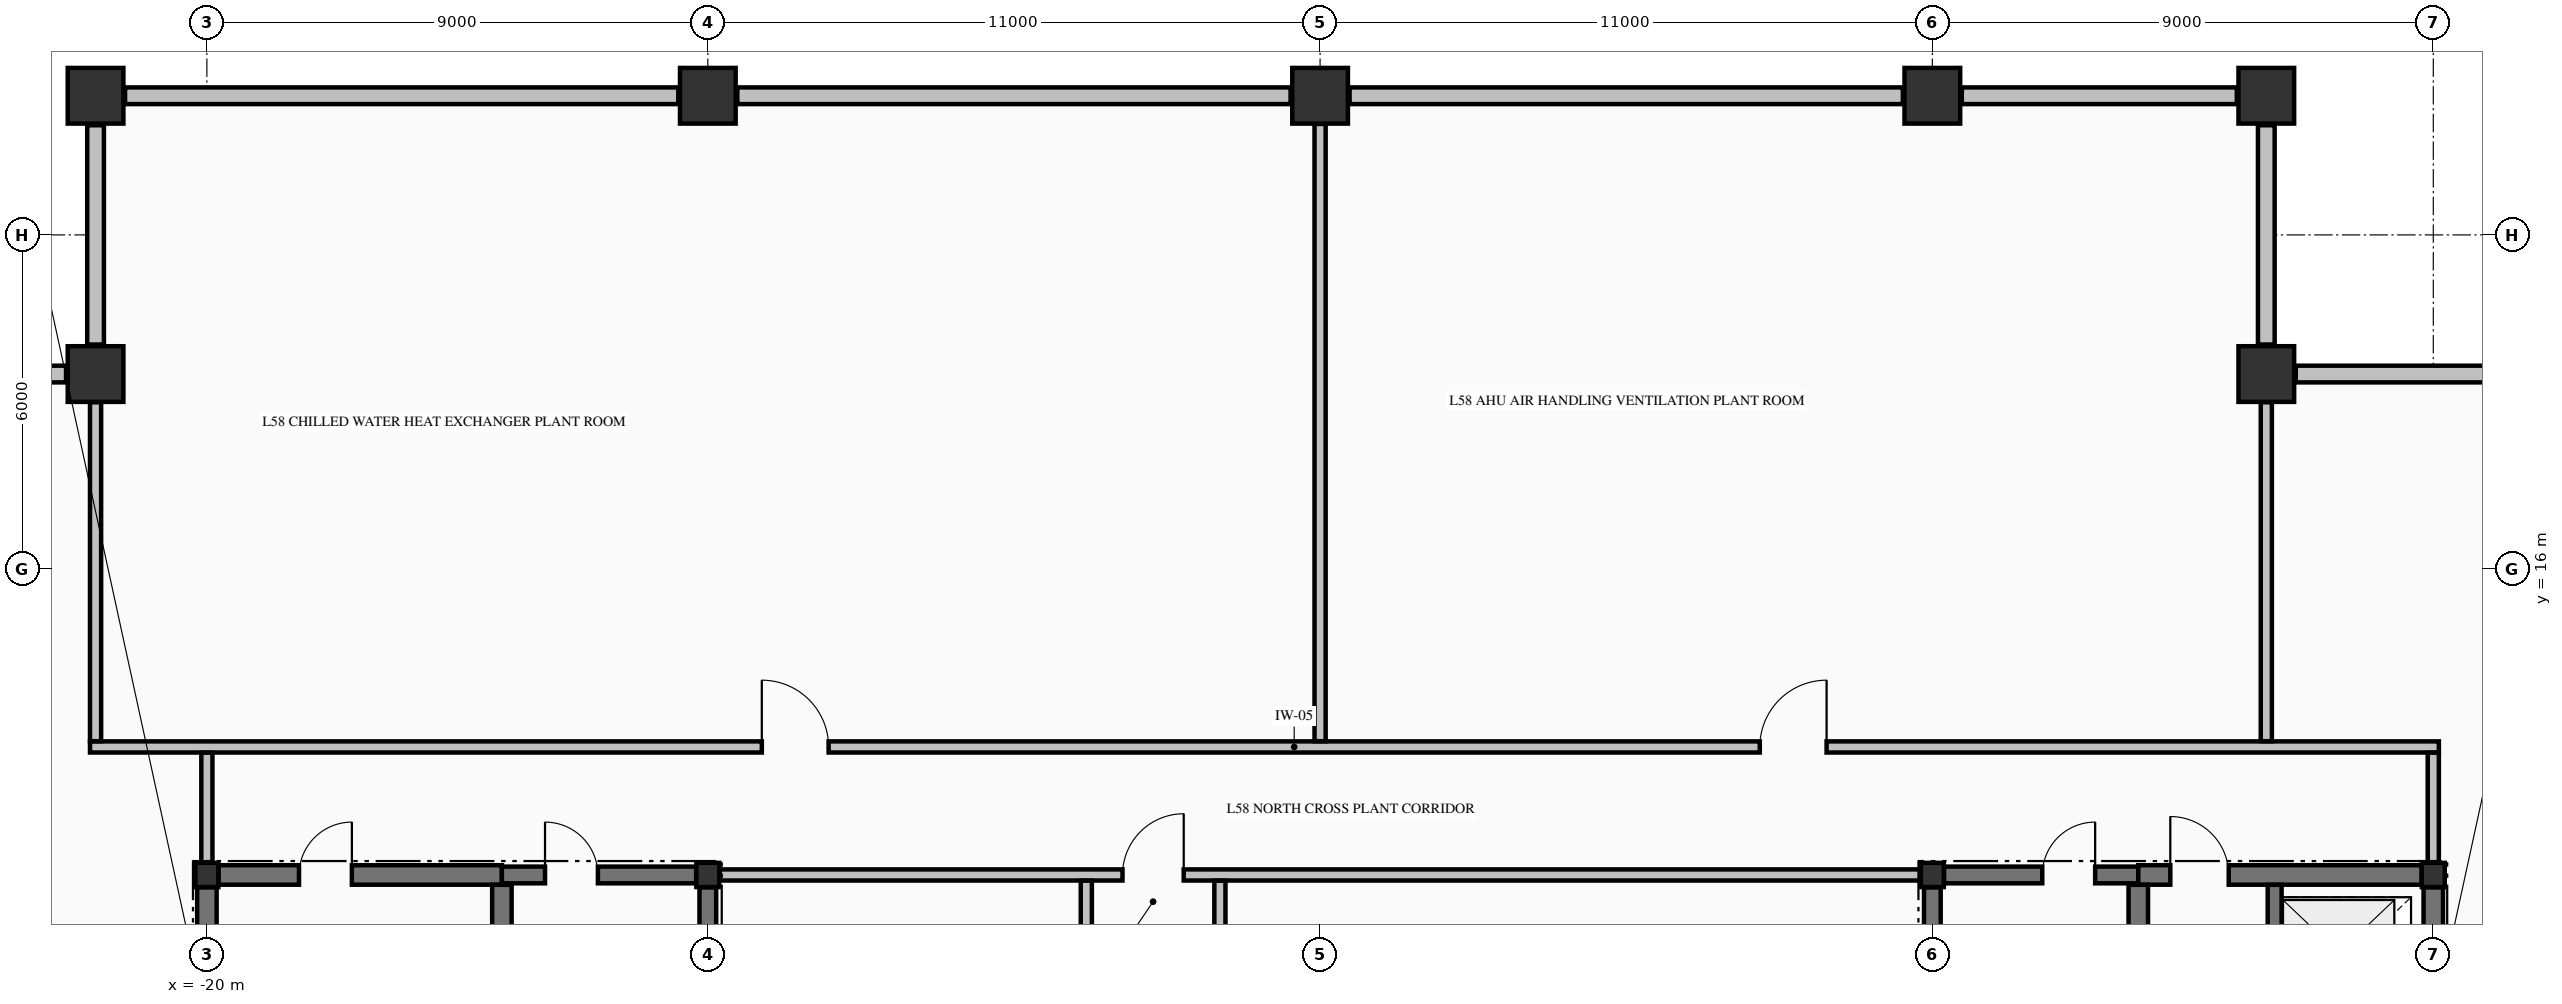
"""IFC4 building model, lengths in metres.
Left out: names, types, materials, properties, quantities, classifications, styles, units other than length and angle.
Written with IfcOpenShell. Run it as: python <this file> out.ifc"""

import sys

from ifc_helpers import new_model, si_unit, direction, frame, frame_2d, origin, origin_2d, place, context, subcontext, project, spatial, rectangle, i_section, extrude, element, fill, save


model = new_model("IFC4")
c1 = context("Model", 3, precision=1e-05, world=origin(), true_north=direction((0.0, 1.0)))
c2 = subcontext(c1, "Body", "Model", "MODEL_VIEW")
j1 = project(units=[si_unit("LENGTHUNIT", "METRE"), si_unit("PLANEANGLEUNIT", "RADIAN")], contexts=[c1])
p1 = place(None, origin())
s1 = spatial("IfcSite", under=j1, at=p1, CompositionType="ELEMENT")
p2 = place(p1, origin())
s2 = spatial("IfcBuilding", under=s1, at=p2, CompositionType="ELEMENT")
p3 = place(p2, frame((0.0, 0.0, 222.06)))
s3 = spatial("IfcBuildingStorey", under=s2, at=p3, CompositionType="ELEMENT", Elevation=222.06)
for number, where, z_axis, x_axis in (
    (1, (-22.0, 24.5, -0.425), (0.0, 0.0, 1.0), (1.0, 0.0, 0.0)),
    (2, (-11.0, 24.5, -0.425), (0.0, 0.0, 1.0), (1.0, 0.0, 0.0)),
    (3, (0.0, 24.5, -0.425), (0.0, 0.0, 1.0), (1.0, 0.0, 0.0)),
    (4, (11.0, 24.5, -0.425), (0.0, 0.0, 1.0), (1.0, 0.0, 0.0)),
    (5, (17.0, 24.5, -0.425), (0.0, 0.0, 1.0), (1.0, 0.0, 0.0)),
    (6, (17.0, 19.5, -0.425), (0.0, 0.0, 1.0), (1.0, 0.0, 0.0)),
    (7, (-22.0, 19.5, -0.425), (0.0, 0.0, 1.0), (1.0, 0.0, 0.0)),
):
    element("IfcColumn", number, at=place(p3, frame(where, z_axis=z_axis, x_axis=x_axis)), inside=s3, PredefinedType="COLUMN", context=c2, shape_type="SweptSolid", body=[
        extrude(rectangle(XDim=1.0, YDim=1.0, at=origin_2d()), origin(), (0.0, 0.0, 1.0), 4.76),
    ])
for number, where, z_axis, x_axis in (
    (8, (-20.0, 10.5, -0.425), (0.0, 0.0, 1.0), (1.0, 0.0, 0.0)),
    (9, (-11.0, 10.5, -0.425), (0.0, 0.0, 1.0), (1.0, 0.0, 0.0)),
    (10, (11.0, 10.5, -0.425), (0.0, 0.0, 1.0), (1.0, 0.0, 0.0)),
    (11, (20.0, 10.5, -0.425), (0.0, 0.0, 1.0), (1.0, 0.0, 0.0)),
):
    element("IfcColumn", number, at=place(p3, frame(where, z_axis=z_axis, x_axis=x_axis)), inside=s3, PredefinedType="COLUMN", context=c2, shape_type="SweptSolid", body=[
        extrude(i_section(OverallWidth=0.412, OverallDepth=0.435, WebThickness=0.036, FlangeThickness=0.058, FilletRadius=0.015, at=origin_2d()), origin(), (0.0, 0.0, 1.0), 4.76),
    ])
p4 = place(p3, frame((21.47, 19.5, 0.0), z_axis=(0.0, 0.0, 1.0), x_axis=(-1.0, 0.0, 0.0)))
e12 = element("IfcWall", 12, at=p4, inside=s3, PredefinedType="STANDARD", context=c2, shape_type="SweptSolid", body=[
    extrude(rectangle(XDim=3.94, YDim=0.3, at=frame_2d((1.97, 0.0))), origin(), (0.0, 0.0, 1.0), 1.927),
])
for number, where, z_axis, x_axis in (
    (13, (17.0, 20.03, 0.0), (0.0, 0.0, 1.0), (0.0, 1.0, 0.0)),
    (14, (-22.0, 23.97, 0.0), (0.0, 0.0, 1.0), (0.0, -1.0, 0.0)),
):
    element("IfcWall", number, at=place(p3, frame(where, z_axis=z_axis, x_axis=x_axis)), inside=s3, PredefinedType="STANDARD", context=c2, shape_type="SweptSolid", body=[
        extrude(rectangle(XDim=3.94, YDim=0.3, at=frame_2d((1.97, 0.0))), origin(), (0.0, 0.0, 1.0), 2.527),
    ])
p5 = place(p3, frame((-22.53, 19.5, 0.0), z_axis=(0.0, 0.0, 1.0), x_axis=(-1.0, 0.0, 0.0)))
e15 = element("IfcWall", 15, at=p5, inside=s3, PredefinedType="STANDARD", context=c2, shape_type="SweptSolid", body=[
    extrude(rectangle(XDim=3.94, YDim=0.3, at=frame_2d((1.97, 0.0))), origin(), (0.0, 0.0, 1.0), 1.927),
])
for number, where, z_axis, x_axis in (
    (16, (-11.53, 24.5, 0.0), (0.0, 0.0, 1.0), (-1.0, 0.0, 0.0)),
    (17, (-0.53, 24.5, 0.0), (0.0, 0.0, 1.0), (-1.0, 0.0, 0.0)),
    (18, (10.47, 24.5, 0.0), (0.0, 0.0, 1.0), (-1.0, 0.0, 0.0)),
):
    element("IfcWall", number, at=place(p3, frame(where, z_axis=z_axis, x_axis=x_axis)), inside=s3, PredefinedType="STANDARD", context=c2, shape_type="SweptSolid", body=[
        extrude(rectangle(XDim=9.94, YDim=0.3, at=frame_2d((4.97, 0.0))), origin(), (0.0, 0.0, 1.0), 1.927),
    ])
p6 = place(p3, frame((16.47, 24.5, 0.0), z_axis=(0.0, 0.0, 1.0), x_axis=(-1.0, 0.0, 0.0)))
e19 = element("IfcWall", 19, at=p6, inside=s3, PredefinedType="STANDARD", context=c2, shape_type="SweptSolid", body=[
    extrude(rectangle(XDim=4.94, YDim=0.3, at=frame_2d((2.47, 0.0))), origin(), (0.0, 0.0, 1.0), 1.927),
])
p7 = place(p3, frame((-19.79, 10.5, 0.0), z_axis=(0.0, 0.0, 1.0), x_axis=(1.0, 0.0, 0.0)))
e20 = element("IfcWall", 20, at=p7, inside=s3, PredefinedType="SHEAR", context=c2, shape_type="SweptSolid", body=[
    extrude(rectangle(XDim=5.09, YDim=0.35, at=frame_2d((2.545, 0.0))), origin(), (0.0, 0.0, 1.0), 4.335),
])
p8 = place(p7, frame((1.445, 0.0, 0.0)))
e21 = element("IfcOpeningElement", 21, at=p8, cuts=e20, PredefinedType="OPENING", context=c2, shape_type="SweptSolid", body=[
    extrude(rectangle(XDim=0.95, YDim=2.02, at=frame_2d((0.475, 1.01))), frame((0.0, 0.185, 0.0), z_axis=(0.0, -1.0, 0.0), x_axis=(1.0, 0.0, 0.0)), (0.0, 0.0, 1.0), 0.37),
])
p9 = place(p3, frame((-14.7, 10.5, 0.0), z_axis=(0.0, 0.0, 1.0), x_axis=(1.0, 0.0, 0.0)))
e22 = element("IfcWall", 22, at=p9, inside=s3, PredefinedType="SHEAR", context=c2, shape_type="SweptSolid", body=[
    extrude(rectangle(XDim=3.49, YDim=0.3, at=frame_2d((1.745, 0.0))), origin(), (0.0, 0.0, 1.0), 4.335),
])
p10 = place(p9, frame((0.775, 0.0, 0.0)))
e23 = element("IfcOpeningElement", 23, at=p10, cuts=e22, PredefinedType="OPENING", context=c2, shape_type="SweptSolid", body=[
    extrude(rectangle(XDim=0.95, YDim=2.02, at=frame_2d((0.475, 1.01))), frame((0.0, 0.16, 0.0), z_axis=(0.0, -1.0, 0.0), x_axis=(1.0, 0.0, 0.0)), (0.0, 0.0, 1.0), 0.32),
])
p11 = place(p3, frame((11.21, 10.5, 0.0), z_axis=(0.0, 0.0, 1.0), x_axis=(1.0, 0.0, 0.0)))
e24 = element("IfcWall", 24, at=p11, inside=s3, PredefinedType="SHEAR", context=c2, shape_type="SweptSolid", body=[
    extrude(rectangle(XDim=3.49, YDim=0.3, at=frame_2d((1.745, 0.0))), origin(), (0.0, 0.0, 1.0), 4.335),
])
p12 = place(p11, frame((1.765, 0.0, 0.0)))
e25 = element("IfcOpeningElement", 25, at=p12, cuts=e24, PredefinedType="OPENING", context=c2, shape_type="SweptSolid", body=[
    extrude(rectangle(XDim=0.95, YDim=2.15, at=frame_2d((0.475, 1.075))), frame((0.0, 0.16, 0.0), z_axis=(0.0, -1.0, 0.0), x_axis=(1.0, 0.0, 0.0)), (0.0, 0.0, 1.0), 0.32),
])
p13 = place(p3, frame((14.7, 10.5, 0.0), z_axis=(0.0, 0.0, 1.0), x_axis=(1.0, 0.0, 0.0)))
e26 = element("IfcWall", 26, at=p13, inside=s3, PredefinedType="SHEAR", context=c2, shape_type="SweptSolid", body=[
    extrude(rectangle(XDim=5.09, YDim=0.35, at=frame_2d((2.545, 0.0))), origin(), (0.0, 0.0, 1.0), 4.335),
])
p14 = place(p13, frame((0.575, 0.0, 0.0)))
e27 = element("IfcOpeningElement", 27, at=p14, cuts=e26, PredefinedType="OPENING", context=c2, shape_type="SweptSolid", body=[
    extrude(rectangle(XDim=1.05, YDim=2.15, at=frame_2d((0.525, 1.075))), frame((0.0, 0.185, 0.0), z_axis=(0.0, -1.0, 0.0), x_axis=(1.0, 0.0, 0.0)), (0.0, 0.0, 1.0), 0.37),
])
p15 = place(p3, frame((-10.788, 10.5, 0.0), z_axis=(0.0, 0.0, 1.0), x_axis=(1.0, 0.0, 0.0)))
e28 = element("IfcWall", 28, at=p15, inside=s3, PredefinedType="PARTITIONING", context=c2, shape_type="SweptSolid", body=[
    extrude(rectangle(XDim=21.576, YDim=0.2, at=frame_2d((10.788, 0.0))), origin(), (0.0, 0.0, 1.0), 4.335),
])
p16 = place(p15, frame((7.238, 0.0, 0.0)))
e29 = element("IfcOpeningElement", 29, at=p16, cuts=e28, PredefinedType="OPENING", context=c2, shape_type="SweptSolid", body=[
    extrude(rectangle(XDim=1.1, YDim=2.15, at=frame_2d((0.55, 1.075))), frame((0.0, 0.11, 0.0), z_axis=(0.0, -1.0, 0.0), x_axis=(1.0, 0.0, 0.0)), (0.0, 0.0, 1.0), 0.22),
])
p17 = place(p3, frame((-22.1, 12.8, 0.0), z_axis=(0.0, 0.0, 1.0), x_axis=(1.0, 0.0, 0.0)))
e30 = element("IfcWall", 30, at=p17, inside=s3, PredefinedType="PARTITIONING", context=c2, shape_type="SweptSolid", body=[
    extrude(rectangle(XDim=42.2, YDim=0.2, at=frame_2d((21.1, 0.0))), origin(), (0.0, 0.0, 1.0), 4.335),
])
p18 = place(p17, frame((12.07, 0.0, 0.0)))
e31 = element("IfcOpeningElement", 31, at=p18, cuts=e30, PredefinedType="OPENING", context=c2, shape_type="SweptSolid", body=[
    extrude(rectangle(XDim=1.2, YDim=2.15, at=frame_2d((0.6, 1.075))), frame((0.0, 0.11, 0.0), z_axis=(0.0, -1.0, 0.0), x_axis=(1.0, 0.0, 0.0)), (0.0, 0.0, 1.0), 0.22),
])
p19 = place(p17, frame((30.0, 0.0, 0.0)))
e32 = element("IfcOpeningElement", 32, at=p19, cuts=e30, PredefinedType="OPENING", context=c2, shape_type="SweptSolid", body=[
    extrude(rectangle(XDim=1.2, YDim=2.15, at=frame_2d((0.6, 1.075))), frame((0.0, 0.11, 0.0), z_axis=(0.0, -1.0, 0.0), x_axis=(1.0, 0.0, 0.0)), (0.0, 0.0, 1.0), 0.22),
])
p20 = place(p3, frame((-20.0, 5.327, 0.0), z_axis=(0.0, 0.0, 1.0), x_axis=(0.0, 1.0, 0.0)))
e33 = element("IfcWall", 33, at=p20, inside=s3, PredefinedType="SHEAR", context=c2, shape_type="SweptSolid", body=[
    extrude(rectangle(XDim=4.952, YDim=0.35, at=frame_2d((2.476, 0.0))), origin(), (0.0, 0.0, 1.0), 4.335),
])
p21 = place(p3, frame((-14.7, 5.852, 0.0), z_axis=(0.0, 0.0, 1.0), x_axis=(0.0, 1.0, 0.0)))
e34 = element("IfcWall", 34, at=p21, inside=s3, PredefinedType="SHEAR", context=c2, shape_type="SweptSolid", body=[
    extrude(rectangle(XDim=4.471, YDim=0.35, at=frame_2d((2.235, 0.0))), origin(), (0.0, 0.0, 1.0), 4.335),
])
for number, where, z_axis, x_axis in (
    (35, (-11.0, 5.852, 0.0), (0.0, 0.0, 1.0), (0.0, 1.0, 0.0)),
    (36, (11.0, 5.852, 0.0), (0.0, 0.0, 1.0), (0.0, 1.0, 0.0)),
):
    element("IfcWall", number, at=place(p3, frame(where, z_axis=z_axis, x_axis=x_axis)), inside=s3, PredefinedType="SHEAR", context=c2, shape_type="SweptSolid", body=[
        extrude(rectangle(XDim=4.427, YDim=0.3, at=frame_2d((2.213, 0.0))), origin(), (0.0, 0.0, 1.0), 4.335),
    ])
p22 = place(p3, frame((14.7, 5.852, 0.0), z_axis=(0.0, 0.0, 1.0), x_axis=(0.0, 1.0, 0.0)))
e37 = element("IfcWall", 37, at=p22, inside=s3, PredefinedType="SHEAR", context=c2, shape_type="SweptSolid", body=[
    extrude(rectangle(XDim=4.471, YDim=0.35, at=frame_2d((2.235, 0.0))), origin(), (0.0, 0.0, 1.0), 4.335),
])
p23 = place(p3, frame((17.15, 7.877, 0.0), z_axis=(0.0, 0.0, 1.0), x_axis=(0.0, 1.0, 0.0)))
e38 = element("IfcWall", 38, at=p23, inside=s3, PredefinedType="SOLIDWALL", context=c2, shape_type="SweptSolid", body=[
    extrude(rectangle(XDim=2.446, YDim=0.25, at=frame_2d((1.223, 0.0))), origin(), (0.0, 0.0, 1.0), 4.335),
])
p24 = place(p3, frame((20.0, 7.877, 0.0), z_axis=(0.0, 0.0, 1.0), x_axis=(0.0, 1.0, 0.0)))
e39 = element("IfcWall", 39, at=p24, inside=s3, PredefinedType="SHEAR", context=c2, shape_type="SweptSolid", body=[
    extrude(rectangle(XDim=2.402, YDim=0.35, at=frame_2d((1.201, 0.0))), origin(), (0.0, 0.0, 1.0), 4.335),
])
p25 = place(p3, frame((-22.0, 12.903, 0.0), z_axis=(0.0, 0.0, 1.0), x_axis=(0.0, 1.0, 0.0)))
e40 = element("IfcWall", 40, at=p25, inside=s3, PredefinedType="PARTITIONING", context=c2, shape_type="SweptSolid", body=[
    extrude(rectangle(XDim=6.091, YDim=0.2, at=frame_2d((3.045, 0.0))), origin(), (0.0, 0.0, 1.0), 4.335),
])
p26 = place(p3, frame((-20.0, 10.723, 0.0), z_axis=(0.0, 0.0, 1.0), x_axis=(0.0, 1.0, 0.0)))
e41 = element("IfcWall", 41, at=p26, inside=s3, PredefinedType="PARTITIONING", context=c2, shape_type="SweptSolid", body=[
    extrude(rectangle(XDim=1.974, YDim=0.2, at=frame_2d((0.987, 0.0))), origin(), (0.0, 0.0, 1.0), 2.127),
])
p27 = place(p3, frame((-4.2, 6.753, 0.0), z_axis=(0.0, 0.0, 1.0), x_axis=(0.0, 1.0, 0.0)))
e42 = element("IfcWall", 42, at=p27, inside=s3, PredefinedType="PARTITIONING", context=c2, shape_type="SweptSolid", body=[
    extrude(rectangle(XDim=3.644, YDim=0.2, at=frame_2d((1.822, 0.0))), origin(), (0.0, 0.0, 1.0), 4.335),
])
p28 = place(p27, frame((0.322, 0.0, 0.0)))
e43 = element("IfcOpeningElement", 43, at=p28, cuts=e42, PredefinedType="OPENING", context=c2, shape_type="SweptSolid", body=[
    extrude(rectangle(XDim=0.95, YDim=2.15, at=frame_2d((0.475, 1.075))), frame((0.0, 0.11, 0.0), z_axis=(0.0, -1.0, 0.0), x_axis=(1.0, 0.0, 0.0)), (0.0, 0.0, 1.0), 0.22),
])
p29 = place(p3, frame((-1.8, 6.703, 0.0), z_axis=(0.0, 0.0, 1.0), x_axis=(0.0, 1.0, 0.0)))
e44 = element("IfcWall", 44, at=p29, inside=s3, PredefinedType="PARTITIONING", context=c2, shape_type="SweptSolid", body=[
    extrude(rectangle(XDim=3.694, YDim=0.2, at=frame_2d((1.847, 0.0))), origin(), (0.0, 0.0, 1.0), 4.335),
])
p30 = place(p3, frame((0.0, 12.903, 0.0), z_axis=(0.0, 0.0, 1.0), x_axis=(0.0, 1.0, 0.0)))
e45 = element("IfcWall", 45, at=p30, inside=s3, PredefinedType="PARTITIONING", context=c2, shape_type="SweptSolid", body=[
    extrude(rectangle(XDim=11.091, YDim=0.2, at=frame_2d((5.545, 0.0))), origin(), (0.0, 0.0, 1.0), 1.927),
])
p31 = place(p3, frame((17.0, 12.903, 0.0), z_axis=(0.0, 0.0, 1.0), x_axis=(0.0, 1.0, 0.0)))
e46 = element("IfcWall", 46, at=p31, inside=s3, PredefinedType="PARTITIONING", context=c2, shape_type="SweptSolid", body=[
    extrude(rectangle(XDim=6.091, YDim=0.2, at=frame_2d((3.045, 0.0))), origin(), (0.0, 0.0, 1.0), 4.335),
])
p32 = place(p3, frame((20.0, 10.723, 0.0), z_axis=(0.0, 0.0, 1.0), x_axis=(0.0, 1.0, 0.0)))
e47 = element("IfcWall", 47, at=p32, inside=s3, PredefinedType="PARTITIONING", context=c2, shape_type="SweptSolid", body=[
    extrude(rectangle(XDim=1.974, YDim=0.2, at=frame_2d((0.987, 0.0))), origin(), (0.0, 0.0, 1.0), 4.335),
])
p33 = place(p10, origin())
e48 = element("IfcDoor", 48, at=p33, inside=s3, OperationType="SINGLE_SWING_LEFT", PredefinedType="DOOR", context=c2, shape_type="SweptSolid", body=[
    extrude(rectangle(XDim=0.95, YDim=2.02, at=frame_2d((0.475, 1.01))), frame((0.0, 0.025, 0.0), z_axis=(0.0, -1.0, 0.0), x_axis=(1.0, 0.0, 0.0)), (0.0, 0.0, 1.0), 0.05),
])
fill(e23, e48)
p34 = place(p12, origin())
e49 = element("IfcDoor", 49, at=p34, inside=s3, OperationType="SINGLE_SWING_RIGHT", PredefinedType="DOOR", context=c2, shape_type="SweptSolid", body=[
    extrude(rectangle(XDim=0.95, YDim=2.15, at=frame_2d((0.475, 1.075))), frame((0.0, 0.025, 0.0), z_axis=(0.0, -1.0, 0.0), x_axis=(1.0, 0.0, 0.0)), (0.0, 0.0, 1.0), 0.05),
])
fill(e25, e49)
p35 = place(p8, origin())
e50 = element("IfcDoor", 50, at=p35, inside=s3, OperationType="SINGLE_SWING_RIGHT", PredefinedType="DOOR", context=c2, shape_type="SweptSolid", body=[
    extrude(rectangle(XDim=0.95, YDim=2.02, at=frame_2d((0.475, 1.01))), frame((0.0, 0.025, 0.0), z_axis=(0.0, -1.0, 0.0), x_axis=(1.0, 0.0, 0.0)), (0.0, 0.0, 1.0), 0.05),
])
fill(e21, e50)
p36 = place(p14, origin())
e51 = element("IfcDoor", 51, at=p36, inside=s3, OperationType="SINGLE_SWING_LEFT", PredefinedType="DOOR", context=c2, shape_type="SweptSolid", body=[
    extrude(rectangle(XDim=1.05, YDim=2.15, at=frame_2d((0.525, 1.075))), frame((0.0, 0.025, 0.0), z_axis=(0.0, -1.0, 0.0), x_axis=(1.0, 0.0, 0.0)), (0.0, 0.0, 1.0), 0.05),
])
fill(e27, e51)
p37 = place(p16, origin())
e52 = element("IfcDoor", 52, at=p37, inside=s3, OperationType="SINGLE_SWING_RIGHT", PredefinedType="DOOR", context=c2, shape_type="SweptSolid", body=[
    extrude(rectangle(XDim=1.1, YDim=2.15, at=frame_2d((0.55, 1.075))), frame((0.0, 0.025, 0.0), z_axis=(0.0, -1.0, 0.0), x_axis=(1.0, 0.0, 0.0)), (0.0, 0.0, 1.0), 0.05),
])
fill(e29, e52)
p38 = place(p18, origin())
e53 = element("IfcDoor", 53, at=p38, inside=s3, OperationType="SINGLE_SWING_LEFT", PredefinedType="DOOR", context=c2, shape_type="SweptSolid", body=[
    extrude(rectangle(XDim=1.2, YDim=2.15, at=frame_2d((0.6, 1.075))), frame((0.0, 0.025, 0.0), z_axis=(0.0, -1.0, 0.0), x_axis=(1.0, 0.0, 0.0)), (0.0, 0.0, 1.0), 0.05),
])
fill(e31, e53)
p39 = place(p19, origin())
e54 = element("IfcDoor", 54, at=p39, inside=s3, OperationType="SINGLE_SWING_RIGHT", PredefinedType="DOOR", context=c2, shape_type="SweptSolid", body=[
    extrude(rectangle(XDim=1.2, YDim=2.15, at=frame_2d((0.6, 1.075))), frame((0.0, 0.025, 0.0), z_axis=(0.0, -1.0, 0.0), x_axis=(1.0, 0.0, 0.0)), (0.0, 0.0, 1.0), 0.05),
])
fill(e32, e54)
save(model, sys.argv[1])
